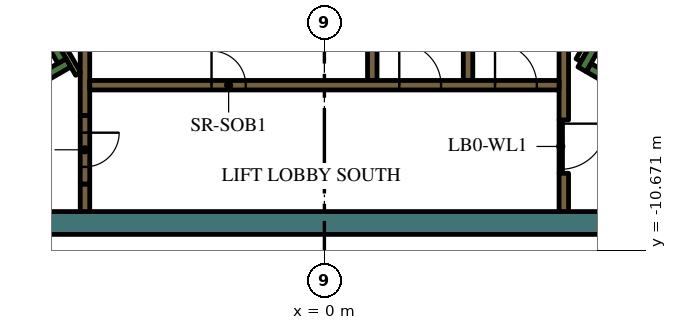
"""IFC4 building model, lengths in metres.
Left out: names, types, materials, properties, quantities, classifications, styles, units other than length and angle.
Written with IfcOpenShell. Run it as: python <this file> out.ifc"""

import sys

from ifc_helpers import new_model, si_unit, direction, frame, frame_2d, origin, place, context, subcontext, project, spatial, rectangle, extrude, element, fill, save


model = new_model("IFC4")
c1 = context("Model", 3, precision=1e-05, world=origin(), true_north=direction((0.0, 1.0)))
c2 = subcontext(c1, "Body", "Model", "MODEL_VIEW")
j1 = project(units=[si_unit("LENGTHUNIT", "METRE"), si_unit("PLANEANGLEUNIT", "RADIAN")], contexts=[c1])
p1 = place(None, origin())
s1 = spatial("IfcSite", under=j1, at=p1, CompositionType="ELEMENT")
p2 = place(p1, origin())
s2 = spatial("IfcBuilding", under=s1, at=p2, CompositionType="ELEMENT")
p3 = place(p2, frame((0.0, 0.0, 275.4)))
s3 = spatial("IfcBuildingStorey", under=s2, at=p3, CompositionType="ELEMENT", Elevation=275.4)
p4 = place(p3, frame((8.904, -9.95, 0.0), z_axis=(0.0, 0.0, 1.0), x_axis=(-1.0, 0.0, 0.0)))
e1 = element("IfcWall", 1, at=p4, inside=s3, PredefinedType="SOLIDWALL", context=c2, shape_type="SweptSolid", body=[
    extrude(rectangle(XDim=22.161, YDim=0.6, at=frame_2d((11.081, 0.0))), origin(), (0.0, 0.0, 1.0), 4.2),
])
p5 = place(p3, frame((12.84, -9.261, 0.0), z_axis=(0.0, 0.0, 1.0), x_axis=(-0.866013990052, 0.500019768644, 0.0)))
e2 = element("IfcWall", 2, at=p5, inside=s3, PredefinedType="SOLIDWALL", context=c2, shape_type="SweptSolid", body=[
    extrude(rectangle(XDim=6.8, YDim=0.25, at=frame_2d((3.4, 0.0))), origin(), (0.0, 0.0, 1.0), 4.2),
])
p6 = place(p3, frame((6.78, -5.906, 0.0), z_axis=(0.0, 0.0, 1.0), x_axis=(0.500223362819, 0.865896406789, 0.0)))
e3 = element("IfcWall", 3, at=p6, inside=s3, PredefinedType="SOLIDWALL", context=c2, shape_type="SweptSolid", body=[
    extrude(rectangle(XDim=0.675, YDim=0.25, at=frame_2d((0.337, 0.0))), origin(), (0.0, 0.0, 1.0), 4.2),
])
p7 = place(p3, frame((-12.84, -9.261, 0.0), z_axis=(0.0, 0.0, 1.0), x_axis=(0.866016039709, 0.500016218704, 0.0)))
e4 = element("IfcWall", 4, at=p7, inside=s3, PredefinedType="SOLIDWALL", context=c2, shape_type="SweptSolid", body=[
    extrude(rectangle(XDim=7.05, YDim=0.25, at=frame_2d((3.525, 0.0))), origin(), (0.0, 0.0, 1.0), 4.2),
])
p8 = place(p3, frame((-6.905, -5.69, 0.0), z_axis=(0.0, 0.0, 1.0), x_axis=(-0.500402024738, 0.865793170242, 0.0)))
e5 = element("IfcWall", 5, at=p8, inside=s3, PredefinedType="SOLIDWALL", context=c2, shape_type="SweptSolid", body=[
    extrude(rectangle(XDim=0.425, YDim=0.25, at=frame_2d((0.212, 0.0))), origin(), (0.0, 0.0, 1.0), 4.2),
])
p9 = place(p3, frame((6.3, -7.24, 0.0), z_axis=(0.0, 0.0, 1.0), x_axis=(0.0, 1.0, 0.0)))
e6 = element("IfcWall", 6, at=p9, inside=s3, PredefinedType="SOLIDWALL", context=c2, shape_type="SweptSolid", body=[
    extrude(rectangle(XDim=3.556, YDim=0.25, at=frame_2d((1.778, 0.0))), origin(), (0.0, 0.0, 1.0), 4.2),
])
p10 = place(p3, frame((6.3, -9.65, 0.0), z_axis=(0.0, 0.0, 1.0), x_axis=(0.0, 1.0, 0.0)))
e7 = element("IfcWall", 7, at=p10, inside=s3, PredefinedType="SOLIDWALL", context=c2, shape_type="SweptSolid", body=[
    extrude(rectangle(XDim=1.008, YDim=0.25, at=frame_2d((0.504, 0.0))), origin(), (0.0, 0.0, 1.0), 4.2),
])
for number, where, z_axis, x_axis in (
    (8, (1.26, -4.0, 0.0), (0.0, 0.0, 1.0), (0.0, -1.0, 0.0)),
    (9, (3.78, -4.0, 0.0), (0.0, 0.0, 1.0), (0.0, -1.0, 0.0)),
):
    element("IfcWall", number, at=place(p3, frame(where, z_axis=z_axis, x_axis=x_axis)), inside=s3, PredefinedType="SOLIDWALL", context=c2, shape_type="SweptSolid", body=[
        extrude(rectangle(XDim=2.2, YDim=0.25, at=frame_2d((1.1, 0.0))), origin(), (0.0, 0.0, 1.0), 4.2),
    ])
p11 = place(p3, frame((-6.3, -7.125, 0.0), z_axis=(0.0, 0.0, 1.0), x_axis=(0.0, 1.0, 0.0)))
e10 = element("IfcWall", 10, at=p11, inside=s3, PredefinedType="SOLIDWALL", context=c2, shape_type="SweptSolid", body=[
    extrude(rectangle(XDim=3.375, YDim=0.25, at=frame_2d((1.687, 0.0))), origin(), (0.0, 0.0, 1.0), 4.2),
])
p12 = place(p3, frame((-6.3, -8.925, 0.0), z_axis=(0.0, 0.0, 1.0), x_axis=(0.0, -1.0, 0.0)))
e11 = element("IfcWall", 11, at=p12, inside=s3, PredefinedType="SOLIDWALL", context=c2, shape_type="SweptSolid", body=[
    extrude(rectangle(XDim=0.725, YDim=0.25, at=frame_2d((0.363, 0.0))), origin(), (0.0, 0.0, 1.0), 4.2),
])
p13 = place(p3, frame((-6.48, -6.027, 0.0), z_axis=(0.0, 0.0, 1.0), x_axis=(-0.499927229454, 0.866067413802, 0.0)))
e12 = element("IfcWall", 12, at=p13, inside=s3, PredefinedType="PARTITIONING", context=c2, shape_type="SweptSolid", body=[
    extrude(rectangle(XDim=0.929, YDim=0.15, at=frame_2d((0.464, 0.0))), origin(), (0.0, 0.0, 1.0), 4.2),
])
p14 = place(p3, frame((6.945, -5.222, 0.0), z_axis=(0.0, 0.0, 1.0), x_axis=(-0.499818422106, -0.866130212453, 0.0)))
e13 = element("IfcWall", 13, at=p14, inside=s3, PredefinedType="PARTITIONING", context=c2, shape_type="SweptSolid", body=[
    extrude(rectangle(XDim=0.514, YDim=0.15, at=frame_2d((0.257, 0.0))), origin(), (0.0, 0.0, 1.0), 3.55),
])
p15 = place(p3, frame((-6.175, -6.325, 0.0), z_axis=(0.0, 0.0, 1.0), x_axis=(1.0, 0.0, 0.0)))
e14 = element("IfcWall", 14, at=p15, inside=s3, PredefinedType="SOLIDWALL", context=c2, shape_type="SweptSolid", body=[
    extrude(rectangle(XDim=12.35, YDim=0.25, at=frame_2d((6.175, 0.0))), origin(), (0.0, 0.0, 1.0), 4.2),
])
p16 = place(p15, frame((3.205, 0.0, 0.0)))
e15 = element("IfcOpeningElement", 15, at=p16, cuts=e14, PredefinedType="OPENING", context=c2, shape_type="SweptSolid", body=[
    extrude(rectangle(XDim=0.9, YDim=2.1, at=frame_2d((0.45, 1.05))), frame((0.0, 0.135, 0.0), z_axis=(0.0, -1.0, 0.0), x_axis=(1.0, 0.0, 0.0)), (0.0, 0.0, 1.0), 0.27),
])
p17 = place(p15, frame((8.145, 0.0, 0.0)))
e16 = element("IfcOpeningElement", 16, at=p17, cuts=e14, PredefinedType="OPENING", context=c2, shape_type="SweptSolid", body=[
    extrude(rectangle(XDim=1.1, YDim=2.1, at=frame_2d((0.55, 1.05))), frame((0.0, 0.135, 0.0), z_axis=(0.0, -1.0, 0.0), x_axis=(1.0, 0.0, 0.0)), (0.0, 0.0, 1.0), 0.27),
])
p18 = place(p15, frame((10.665, 0.0, 0.0)))
e17 = element("IfcOpeningElement", 17, at=p18, cuts=e14, PredefinedType="OPENING", context=c2, shape_type="SweptSolid", body=[
    extrude(rectangle(XDim=1.1, YDim=2.1, at=frame_2d((0.55, 1.05))), frame((0.0, 0.135, 0.0), z_axis=(0.0, -1.0, 0.0), x_axis=(1.0, 0.0, 0.0)), (0.0, 0.0, 1.0), 0.27),
])
p19 = place(p3, frame((-6.3, -7.125, 0.0), z_axis=(0.0, 0.0, 1.0), x_axis=(0.0, -1.0, 0.0)))
e18 = element("IfcWall", 18, at=p19, inside=s3, PredefinedType="SOLIDWALL", context=c2, shape_type="SweptSolid", body=[
    extrude(rectangle(XDim=1.8, YDim=0.25, at=frame_2d((0.9, 0.0))), origin(), (0.0, 0.0, 1.0), 4.2),
])
p20 = place(p19, frame((0.45, 0.0, 0.0)))
e19 = element("IfcOpeningElement", 19, at=p20, cuts=e18, PredefinedType="OPENING", context=c2, shape_type="SweptSolid", body=[
    extrude(rectangle(XDim=0.9, YDim=2.1, at=frame_2d((0.45, 1.05))), frame((0.0, 0.135, 0.0), z_axis=(0.0, -1.0, 0.0), x_axis=(1.0, 0.0, 0.0)), (0.0, 0.0, 1.0), 0.27),
])
p21 = place(p3, frame((6.22, -7.237, 0.0), z_axis=(0.0, 0.0, 1.0), x_axis=(0.0, -1.0, 0.0)))
e20 = element("IfcWall", 20, at=p21, inside=s3, PredefinedType="PARTITIONING", context=c2, shape_type="SweptSolid", body=[
    extrude(rectangle(XDim=1.4, YDim=0.09, at=frame_2d((0.7, 0.0))), origin(), (0.0, 0.0, 1.0), 3.55),
])
p22 = place(p21, frame((0.1, 0.0, 0.0)))
e21 = element("IfcOpeningElement", 21, at=p22, cuts=e20, PredefinedType="OPENING", context=c2, shape_type="SweptSolid", body=[
    extrude(rectangle(XDim=1.2, YDim=2.1, at=frame_2d((0.6, 1.05))), frame((0.0, 0.055, 0.0), z_axis=(0.0, -1.0, 0.0), x_axis=(1.0, 0.0, 0.0)), (0.0, 0.0, 1.0), 0.11),
])
p23 = place(p16, origin())
e22 = element("IfcDoor", 22, at=p23, inside=s3, OperationType="SINGLE_SWING_LEFT", PredefinedType="DOOR", context=c2, shape_type="SweptSolid", body=[
    extrude(rectangle(XDim=0.9, YDim=2.1, at=frame_2d((0.45, 1.05))), frame((0.0, 0.025, 0.0), z_axis=(0.0, -1.0, 0.0), x_axis=(1.0, 0.0, 0.0)), (0.0, 0.0, 1.0), 0.05),
])
fill(e15, e22)
p24 = place(p17, origin())
e23 = element("IfcDoor", 23, at=p24, inside=s3, OperationType="DOUBLE_DOOR_SLIDING", PredefinedType="DOOR", context=c2, shape_type="SweptSolid", body=[
    extrude(rectangle(XDim=1.1, YDim=2.1, at=frame_2d((0.55, 1.05))), frame((0.0, 0.025, 0.0), z_axis=(0.0, -1.0, 0.0), x_axis=(1.0, 0.0, 0.0)), (0.0, 0.0, 1.0), 0.05),
])
fill(e16, e23)
p25 = place(p18, origin())
e24 = element("IfcDoor", 24, at=p25, inside=s3, OperationType="DOUBLE_DOOR_SLIDING", PredefinedType="DOOR", context=c2, shape_type="SweptSolid", body=[
    extrude(rectangle(XDim=1.1, YDim=2.1, at=frame_2d((0.55, 1.05))), frame((0.0, 0.025, 0.0), z_axis=(0.0, -1.0, 0.0), x_axis=(1.0, 0.0, 0.0)), (0.0, 0.0, 1.0), 0.05),
])
fill(e17, e24)
p26 = place(p20, origin())
e25 = element("IfcDoor", 25, at=p26, inside=s3, OperationType="SINGLE_SWING_LEFT", PredefinedType="DOOR", context=c2, shape_type="SweptSolid", body=[
    extrude(rectangle(XDim=0.9, YDim=2.1, at=frame_2d((0.45, 1.05))), frame((0.0, 0.025, 0.0), z_axis=(0.0, -1.0, 0.0), x_axis=(1.0, 0.0, 0.0)), (0.0, 0.0, 1.0), 0.05),
])
fill(e19, e25)
p27 = place(p22, origin())
e26 = element("IfcDoor", 26, at=p27, inside=s3, OperationType="SINGLE_SWING_LEFT", PredefinedType="DOOR", context=c2, shape_type="SweptSolid", body=[
    extrude(rectangle(XDim=1.2, YDim=2.1, at=frame_2d((0.6, 1.05))), frame((0.0, 0.025, 0.0), z_axis=(0.0, -1.0, 0.0), x_axis=(1.0, 0.0, 0.0)), (0.0, 0.0, 1.0), 0.05),
])
fill(e21, e26)
save(model, sys.argv[1])
